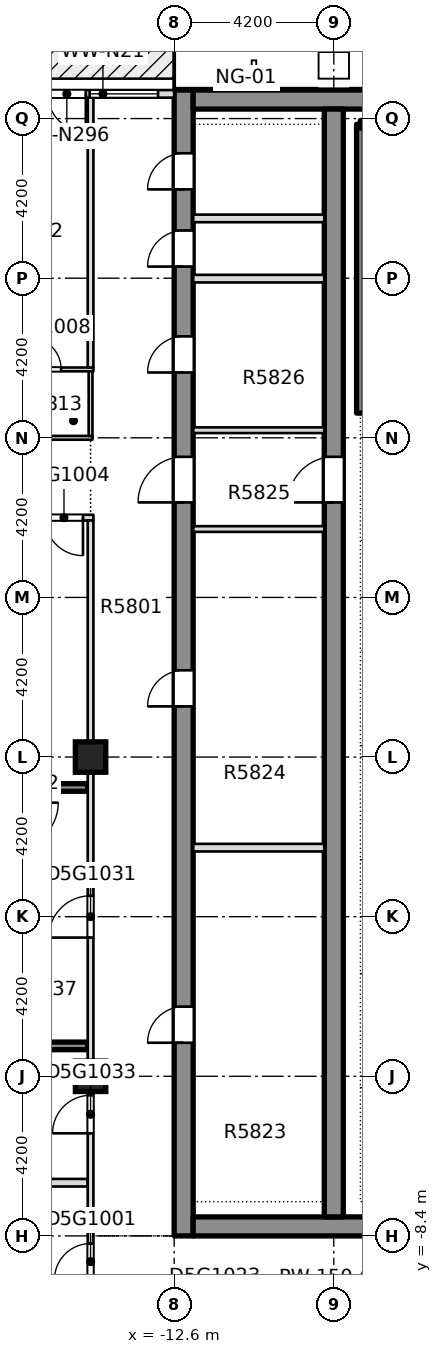
"""IFC4 building model, lengths in metres.
Left out: names, types, materials, properties, quantities, classifications, styles, units other than length and angle.
Written with IfcOpenShell. Run it as: python <this file> out.ifc"""

import sys

from ifc_helpers import new_model, si_unit, direction, frame, frame_2d, origin, origin_2d, place, context, subcontext, project, spatial, rectangle, extrude, element, fill, save


model = new_model("IFC4")
c1 = context("Model", 3, precision=1e-05, world=origin(), true_north=direction((0.0, 1.0)))
c2 = subcontext(c1, "Body", "Model", "MODEL_VIEW")
j1 = project(units=[si_unit("LENGTHUNIT", "METRE"), si_unit("PLANEANGLEUNIT", "RADIAN")], contexts=[c1])
p1 = place(None, origin())
s1 = spatial("IfcSite", under=j1, at=p1, CompositionType="ELEMENT")
p2 = place(p1, origin())
s2 = spatial("IfcBuilding", under=s1, at=p2, CompositionType="ELEMENT")
p3 = place(p2, frame((0.0, 0.0, 223.45)))
s3 = spatial("IfcBuildingStorey", under=s2, at=p3, CompositionType="ELEMENT", Elevation=223.45)
p4 = place(p3, frame((-12.35, -8.4, -0.4), z_axis=(0.0, 0.0, 1.0), x_axis=(0.0, 1.0, 0.0)))
e1 = element("IfcWall", 1, at=p4, inside=s3, PredefinedType="SHEAR", context=c2, shape_type="SweptSolid", body=[
    extrude(rectangle(XDim=30.15, YDim=0.5, at=frame_2d((15.075, 0.0))), origin(), (0.0, 0.0, 1.0), 3.45),
])
p5 = place(p4, frame((5.083, 0.0, 0.4)))
e2 = element("IfcOpeningElement", 2, at=p5, cuts=e1, PredefinedType="OPENING", context=c2, shape_type="SweptSolid", body=[
    extrude(rectangle(XDim=0.95, YDim=2.1, at=frame_2d((0.475, 1.05))), frame((0.0, 0.26, 0.0), z_axis=(0.0, -1.0, 0.0), x_axis=(1.0, 0.0, 0.0)), (0.0, 0.0, 1.0), 0.52),
])
p6 = place(p4, frame((13.933, 0.0, 0.4)))
e3 = element("IfcOpeningElement", 3, at=p6, cuts=e1, PredefinedType="OPENING", context=c2, shape_type="SweptSolid", body=[
    extrude(rectangle(XDim=0.95, YDim=2.1, at=frame_2d((0.475, 1.05))), frame((0.0, 0.26, 0.0), z_axis=(0.0, -1.0, 0.0), x_axis=(1.0, 0.0, 0.0)), (0.0, 0.0, 1.0), 0.52),
])
p7 = place(p4, frame((22.719, 0.0, 0.4)))
e4 = element("IfcOpeningElement", 4, at=p7, cuts=e1, PredefinedType="OPENING", context=c2, shape_type="SweptSolid", body=[
    extrude(rectangle(XDim=0.95, YDim=2.1, at=frame_2d((0.475, 1.05))), frame((0.0, 0.26, 0.0), z_axis=(0.0, -1.0, 0.0), x_axis=(1.0, 0.0, 0.0)), (0.0, 0.0, 1.0), 0.52),
])
p8 = place(p4, frame((25.506, 0.0, 0.4)))
e5 = element("IfcOpeningElement", 5, at=p8, cuts=e1, PredefinedType="OPENING", context=c2, shape_type="SweptSolid", body=[
    extrude(rectangle(XDim=0.95, YDim=2.1, at=frame_2d((0.475, 1.05))), frame((0.0, 0.26, 0.0), z_axis=(0.0, -1.0, 0.0), x_axis=(1.0, 0.0, 0.0)), (0.0, 0.0, 1.0), 0.52),
])
p9 = place(p4, frame((27.537, 0.0, 0.4)))
e6 = element("IfcOpeningElement", 6, at=p9, cuts=e1, PredefinedType="OPENING", context=c2, shape_type="SweptSolid", body=[
    extrude(rectangle(XDim=0.95, YDim=2.1, at=frame_2d((0.475, 1.05))), frame((0.0, 0.26, 0.0), z_axis=(0.0, -1.0, 0.0), x_axis=(1.0, 0.0, 0.0)), (0.0, 0.0, 1.0), 0.52),
])
p10 = place(p4, frame((19.3, 0.0, 0.4)))
e7 = element("IfcOpeningElement", 7, at=p10, cuts=e1, PredefinedType="OPENING", context=c2, shape_type="SweptSolid", body=[
    extrude(rectangle(XDim=1.2, YDim=2.1, at=frame_2d((0.6, 1.05))), frame((0.0, 0.26, 0.0), z_axis=(0.0, -1.0, 0.0), x_axis=(1.0, 0.0, 0.0)), (0.0, 0.0, 1.0), 0.52),
])
p11 = place(p3, frame((-12.1, -8.15, -0.4), z_axis=(0.0, 0.0, 1.0), x_axis=(1.0, 0.0, 0.0)))
e8 = element("IfcWall", 8, at=p11, inside=s3, PredefinedType="SHEAR", context=c2, shape_type="SweptSolid", body=[
    extrude(rectangle(XDim=24.2, YDim=0.5, at=frame_2d((12.1, 0.0))), origin(), (0.0, 0.0, 1.0), 3.45),
])
p12 = place(p11, frame((7.35, 0.0, 0.4)))
e9 = element("IfcOpeningElement", 9, at=p12, cuts=e8, PredefinedType="OPENING", context=c2, shape_type="SweptSolid", body=[
    extrude(rectangle(XDim=1.8, YDim=2.1, at=frame_2d((0.9, 1.05))), frame((0.0, 0.26, 0.0), z_axis=(0.0, -1.0, 0.0), x_axis=(1.0, 0.0, 0.0)), (0.0, 0.0, 1.0), 0.52),
])
p13 = place(p11, frame((15.05, 0.0, 0.4)))
e10 = element("IfcOpeningElement", 10, at=p13, cuts=e8, PredefinedType="OPENING", context=c2, shape_type="SweptSolid", body=[
    extrude(rectangle(XDim=1.8, YDim=2.1, at=frame_2d((0.9, 1.05))), frame((0.0, 0.26, 0.0), z_axis=(0.0, -1.0, 0.0), x_axis=(1.0, 0.0, 0.0)), (0.0, 0.0, 1.0), 0.52),
])
p14 = place(p3, frame((-12.1, 21.5, -0.4), z_axis=(0.0, 0.0, 1.0), x_axis=(1.0, 0.0, 0.0)))
e11 = element("IfcWall", 11, at=p14, inside=s3, PredefinedType="SHEAR", context=c2, shape_type="SweptSolid", body=[
    extrude(rectangle(XDim=24.2, YDim=0.5, at=frame_2d((12.1, 0.0))), origin(), (0.0, 0.0, 1.0), 3.45),
])
p15 = place(p3, frame((-8.4, -7.9, -0.4), z_axis=(0.0, 0.0, 1.0), x_axis=(0.0, 1.0, 0.0)))
e12 = element("IfcWall", 12, at=p15, inside=s3, PredefinedType="SHEAR", context=c2, shape_type="SweptSolid", body=[
    extrude(rectangle(XDim=29.15, YDim=0.5, at=frame_2d((14.575, 0.0))), origin(), (0.0, 0.0, 1.0), 3.45),
])
p16 = place(p15, frame((18.8, 0.0, 0.4)))
e13 = element("IfcOpeningElement", 13, at=p16, cuts=e12, PredefinedType="OPENING", context=c2, shape_type="SweptSolid", body=[
    extrude(rectangle(XDim=1.2, YDim=2.1, at=frame_2d((0.6, 1.05))), frame((0.0, 0.26, 0.0), z_axis=(0.0, -1.0, 0.0), x_axis=(1.0, 0.0, 0.0)), (0.0, 0.0, 1.0), 0.52),
])
for number, where, z_axis, x_axis in (
    (14, (-14.8, -4.2, -0.4), (0.0, 0.0, 1.0), (1.0, 0.0, 0.0)),
    (15, (-14.8, 4.2, -0.4), (0.0, 0.0, 1.0), (1.0, 0.0, 0.0)),
):
    element("IfcColumn", number, at=place(p3, frame(where, z_axis=z_axis, x_axis=x_axis)), inside=s3, PredefinedType="COLUMN", context=c2, shape_type="SweptSolid", body=[
        extrude(rectangle(XDim=0.8, YDim=0.8, at=origin_2d()), origin(), (0.0, 0.0, 1.0), 3.45),
    ])
p17 = place(p3, frame((-25.75, -7.0, 0.0), z_axis=(0.0, 0.0, 1.0), x_axis=(1.0, 0.0, 0.0)))
e16 = element("IfcWall", 16, at=p17, inside=s3, PredefinedType="PARTITIONING", context=c2, shape_type="SweptSolid", body=[
    extrude(rectangle(XDim=10.875, YDim=0.2, at=frame_2d((5.438, 0.0))), origin(), (0.0, 0.0, 1.0), 3.05),
])
p18 = place(p3, frame((-23.0, -3.4, 0.0), z_axis=(0.0, 0.0, 1.0), x_axis=(1.0, 0.0, 0.0)))
e17 = element("IfcWall", 17, at=p18, inside=s3, PredefinedType="SOLIDWALL", context=c2, shape_type="SweptSolid", body=[
    extrude(rectangle(XDim=8.125, YDim=0.2, at=frame_2d((4.062, 0.0))), origin(), (0.0, 0.0, 1.0), 3.05),
])
p19 = place(p3, frame((-20.45, 3.4, 0.0), z_axis=(0.0, 0.0, 1.0), x_axis=(1.0, 0.0, 0.0)))
e18 = element("IfcWall", 18, at=p19, inside=s3, PredefinedType="SOLIDWALL", context=c2, shape_type="SweptSolid", body=[
    extrude(rectangle(XDim=5.575, YDim=0.2, at=frame_2d((2.788, 0.0))), origin(), (0.0, 0.0, 1.0), 3.05),
])
p20 = place(p3, frame((-25.75, 10.5, 0.0), z_axis=(0.0, 0.0, 1.0), x_axis=(1.0, 0.0, 0.0)))
e19 = element("IfcWall", 19, at=p20, inside=s3, PredefinedType="PARTITIONING", context=c2, shape_type="SweptSolid", body=[
    extrude(rectangle(XDim=11.025, YDim=0.15, at=frame_2d((5.512, 0.0))), origin(), (0.0, 0.0, 1.0), 3.05),
])
p21 = place(p20, frame((9.75, 0.0, 0.0)))
e20 = element("IfcOpeningElement", 20, at=p21, cuts=e19, PredefinedType="OPENING", context=c2, shape_type="SweptSolid", body=[
    extrude(rectangle(XDim=1.0, YDim=2.1, at=frame_2d((0.5, 1.05))), frame((0.0, 0.085, 0.0), z_axis=(0.0, -1.0, 0.0), x_axis=(1.0, 0.0, 0.0)), (0.0, 0.0, 1.0), 0.17),
])
p22 = place(p3, frame((-17.25, 12.6, 0.0), z_axis=(0.0, 0.0, 1.0), x_axis=(1.0, 0.0, 0.0)))
e21 = element("IfcWall", 21, at=p22, inside=s3, PredefinedType="PARTITIONING", context=c2, shape_type="SweptSolid", body=[
    extrude(rectangle(XDim=2.5, YDim=0.1, at=frame_2d((1.25, 0.0))), origin(), (0.0, 0.0, 1.0), 3.05),
])
p23 = place(p3, frame((-17.25, 14.4, 0.0), z_axis=(0.0, 0.0, 1.0), x_axis=(1.0, 0.0, 0.0)))
e22 = element("IfcWall", 22, at=p23, inside=s3, PredefinedType="PARTITIONING", context=c2, shape_type="SweptSolid", body=[
    extrude(rectangle(XDim=2.525, YDim=0.1, at=frame_2d((1.262, 0.0))), origin(), (0.0, 0.0, 1.0), 3.05),
])
p24 = place(p23, frame((0.825, 0.0, 0.0)))
e23 = element("IfcOpeningElement", 23, at=p24, cuts=e22, PredefinedType="OPENING", context=c2, shape_type="SweptSolid", body=[
    extrude(rectangle(XDim=0.85, YDim=2.1, at=frame_2d((0.425, 1.05))), frame((0.0, 0.06, 0.0), z_axis=(0.0, -1.0, 0.0), x_axis=(1.0, 0.0, 0.0)), (0.0, 0.0, 1.0), 0.12),
])
p25 = place(p3, frame((-14.8, -10.38, 0.0), z_axis=(0.0, 0.0, 1.0), x_axis=(0.0, 1.0, 0.0)))
e24 = element("IfcWall", 24, at=p25, inside=s3, PredefinedType="PARTITIONING", context=c2, shape_type="SweptSolid", body=[
    extrude(rectangle(XDim=20.805, YDim=0.15, at=frame_2d((10.402, 0.0))), origin(), (0.0, 0.0, 1.0), 3.05),
])
p26 = place(p25, frame((0.83, 0.0, 0.0)))
e25 = element("IfcOpeningElement", 25, at=p26, cuts=e24, PredefinedType="OPENING", context=c2, shape_type="SweptSolid", body=[
    extrude(rectangle(XDim=0.95, YDim=2.1, at=frame_2d((0.475, 1.05))), frame((0.0, 0.085, 0.0), z_axis=(0.0, -1.0, 0.0), x_axis=(1.0, 0.0, 0.0)), (0.0, 0.0, 1.0), 0.17),
])
p27 = place(p25, frame((9.83, 0.0, 0.0)))
e26 = element("IfcOpeningElement", 26, at=p27, cuts=e24, PredefinedType="OPENING", context=c2, shape_type="SweptSolid", body=[
    extrude(rectangle(XDim=1.1, YDim=2.1, at=frame_2d((0.55, 1.05))), frame((0.0, 0.085, 0.0), z_axis=(0.0, -1.0, 0.0), x_axis=(1.0, 0.0, 0.0)), (0.0, 0.0, 1.0), 0.17),
])
p28 = place(p25, frame((4.68, 0.0, 0.0)))
e27 = element("IfcOpeningElement", 27, at=p28, cuts=e24, PredefinedType="OPENING", context=c2, shape_type="SweptSolid", body=[
    extrude(rectangle(XDim=1.0, YDim=2.1, at=frame_2d((0.5, 1.05))), frame((0.0, 0.085, 0.0), z_axis=(0.0, -1.0, 0.0), x_axis=(1.0, 0.0, 0.0)), (0.0, 0.0, 1.0), 0.17),
])
p29 = place(p3, frame((-14.8, 12.65, 0.0), z_axis=(0.0, 0.0, 1.0), x_axis=(0.0, 1.0, 0.0)))
e28 = element("IfcWall", 28, at=p29, inside=s3, PredefinedType="PARTITIONING", context=c2, shape_type="SweptSolid", body=[
    extrude(rectangle(XDim=1.7, YDim=0.1, at=frame_2d((0.85, 0.0))), origin(), (0.0, 0.0, 1.0), 3.05),
])
p30 = place(p3, frame((-14.8, 14.45, 0.0), z_axis=(0.0, 0.0, 1.0), x_axis=(0.0, 1.0, 0.0)))
e29 = element("IfcWall", 29, at=p30, inside=s3, PredefinedType="PARTITIONING", context=c2, shape_type="SweptSolid", body=[
    extrude(rectangle(XDim=7.1, YDim=0.15, at=frame_2d((3.55, 0.0))), origin(), (0.0, 0.0, 1.0), 3.05),
])
p31 = place(p3, frame((-12.6, 21.65, 0.0), z_axis=(0.0, 0.0, 1.0), x_axis=(-1.0, 0.0, 0.0)))
e30 = element("IfcWall", 30, at=p31, inside=s3, PredefinedType="STANDARD", context=c2, shape_type="SweptSolid", body=[
    extrude(rectangle(XDim=3.75, YDim=0.2, at=frame_2d((1.875, 0.0))), origin(), (0.0, 0.0, 1.0), 3.05),
])
p32 = place(p31, frame((0.425, 0.0, 0.2)))
e31 = element("IfcOpeningElement", 31, at=p32, cuts=e30, PredefinedType="OPENING", context=c2, shape_type="SweptSolid", body=[
    extrude(rectangle(XDim=1.8, YDim=2.65, at=frame_2d((0.9, 1.325))), frame((0.0, 0.11, 0.0), z_axis=(0.0, -1.0, 0.0), x_axis=(1.0, 0.0, 0.0)), (0.0, 0.0, 1.0), 0.22),
])
p33 = place(p31, frame((2.325, 0.0, 0.0)))
e32 = element("IfcOpeningElement", 32, at=p33, cuts=e30, PredefinedType="OPENING", context=c2, shape_type="SweptSolid", body=[
    extrude(rectangle(XDim=1.0, YDim=2.4, at=frame_2d((0.5, 1.2))), frame((0.0, 0.11, 0.0), z_axis=(0.0, -1.0, 0.0), x_axis=(1.0, 0.0, 0.0)), (0.0, 0.0, 1.0), 0.22),
])
p34 = place(p3, frame((-12.099, 1.816, 0.0), z_axis=(0.0, 0.0, 1.0), x_axis=(1.0, 0.0, 0.0)))
e33 = element("IfcWall", 33, at=p34, inside=s3, PredefinedType="PARTITIONING", context=c2, shape_type="SweptSolid", body=[
    extrude(rectangle(XDim=3.448, YDim=0.2, at=frame_2d((1.724, 0.0))), origin(), (0.0, 0.0, 1.0), 3.05),
])
for number, where, z_axis, x_axis in (
    (34, (-12.099, 10.2, 0.0), (0.0, 0.0, 1.0), (1.0, 0.0, 0.0)),
    (35, (-12.099, 12.8, 0.0), (0.0, 0.0, 1.0), (1.0, 0.0, 0.0)),
):
    element("IfcWall", number, at=place(p3, frame(where, z_axis=z_axis, x_axis=x_axis)), inside=s3, PredefinedType="PARTITIONING", context=c2, shape_type="SweptSolid", body=[
        extrude(rectangle(XDim=3.448, YDim=0.15, at=frame_2d((1.724, 0.0))), origin(), (0.0, 0.0, 1.0), 3.05),
    ])
for number, where, z_axis, x_axis in (
    (36, (-12.099, 16.788, 0.0), (0.0, 0.0, 1.0), (1.0, 0.0, 0.0)),
    (37, (-12.099, 18.373, 0.0), (0.0, 0.0, 1.0), (1.0, 0.0, 0.0)),
):
    element("IfcWall", number, at=place(p3, frame(where, z_axis=z_axis, x_axis=x_axis)), inside=s3, PredefinedType="PARTITIONING", context=c2, shape_type="SweptSolid", body=[
        extrude(rectangle(XDim=3.448, YDim=0.2, at=frame_2d((1.724, 0.0))), origin(), (0.0, 0.0, 1.0), 3.05),
    ])
p35 = place(p3, frame((-7.7, 13.25, 0.0), z_axis=(0.0, 0.0, 1.0), x_axis=(0.0, 1.0, 0.0)))
e38 = element("IfcWall", 38, at=p35, inside=s3, PredefinedType="SOLIDWALL", context=c2, shape_type="SweptSolid", body=[
    extrude(rectangle(XDim=7.6, YDim=0.2, at=frame_2d((3.8, 0.0))), origin(), (0.0, 0.0, 1.0), 3.05),
])
p36 = place(p3, frame((-7.7, 20.85, 0.0), z_axis=(0.0, 0.0, 1.0), x_axis=(1.0, 0.0, 0.0)))
e39 = element("IfcWall", 39, at=p36, inside=s3, PredefinedType="SOLIDWALL", context=c2, shape_type="SweptSolid", body=[
    extrude(rectangle(XDim=3.55, YDim=0.2, at=frame_2d((1.775, 0.0))), origin(), (0.0, 0.0, 1.0), 3.05),
])
p37 = place(p26, origin())
e40 = element("IfcDoor", 40, at=p37, inside=s3, OperationType="SINGLE_SWING_LEFT", PredefinedType="DOOR", context=c2, shape_type="SweptSolid", body=[
    extrude(rectangle(XDim=0.95, YDim=2.1, at=frame_2d((0.475, 1.05))), frame((0.0, 0.025, 0.0), z_axis=(0.0, -1.0, 0.0), x_axis=(1.0, 0.0, 0.0)), (0.0, 0.0, 1.0), 0.05),
])
fill(e25, e40)
p38 = place(p21, origin())
e41 = element("IfcDoor", 41, at=p38, inside=s3, OperationType="SINGLE_SWING_RIGHT", PredefinedType="DOOR", context=c2, shape_type="SweptSolid", body=[
    extrude(rectangle(XDim=1.0, YDim=2.1, at=frame_2d((0.5, 1.05))), frame((0.0, 0.025, 0.0), z_axis=(0.0, -1.0, 0.0), x_axis=(1.0, 0.0, 0.0)), (0.0, 0.0, 1.0), 0.05),
])
fill(e20, e41)
p39 = place(p24, origin())
e42 = element("IfcDoor", 42, at=p39, inside=s3, OperationType="SINGLE_SWING_RIGHT", PredefinedType="DOOR", context=c2, shape_type="SweptSolid", body=[
    extrude(rectangle(XDim=0.85, YDim=2.1, at=frame_2d((0.425, 1.05))), frame((0.0, 0.025, 0.0), z_axis=(0.0, -1.0, 0.0), x_axis=(1.0, 0.0, 0.0)), (0.0, 0.0, 1.0), 0.05),
])
fill(e23, e42)
p40 = place(p27, origin())
e43 = element("IfcDoor", 43, at=p40, inside=s3, OperationType="SINGLE_SWING_RIGHT", PredefinedType="DOOR", context=c2, shape_type="SweptSolid", body=[
    extrude(rectangle(XDim=1.1, YDim=2.1, at=frame_2d((0.55, 1.05))), frame((0.0, 0.025, 0.0), z_axis=(0.0, -1.0, 0.0), x_axis=(1.0, 0.0, 0.0)), (0.0, 0.0, 1.0), 0.05),
])
fill(e26, e43)
p41 = place(p28, origin())
e44 = element("IfcDoor", 44, at=p41, inside=s3, OperationType="SINGLE_SWING_LEFT", PredefinedType="DOOR", context=c2, shape_type="SweptSolid", body=[
    extrude(rectangle(XDim=1.0, YDim=2.1, at=frame_2d((0.5, 1.05))), frame((0.0, 0.025, 0.0), z_axis=(0.0, -1.0, 0.0), x_axis=(1.0, 0.0, 0.0)), (0.0, 0.0, 1.0), 0.05),
])
fill(e27, e44)
p42 = place(p32, origin())
e45 = element("IfcWindow", 45, at=p42, inside=s3, PartitioningType="SINGLE_PANEL", PredefinedType="WINDOW", context=c2, shape_type="SweptSolid", body=[
    extrude(rectangle(XDim=1.8, YDim=2.65, at=frame_2d((0.9, 1.325))), frame((0.0, 0.03, 0.0), z_axis=(0.0, -1.0, 0.0), x_axis=(1.0, 0.0, 0.0)), (0.0, 0.0, 1.0), 0.06),
])
fill(e31, e45)
p43 = place(p33, origin())
e46 = element("IfcDoor", 46, at=p43, inside=s3, OperationType="SINGLE_SWING_LEFT", PredefinedType="DOOR", context=c2, shape_type="SweptSolid", body=[
    extrude(rectangle(XDim=1.0, YDim=2.4, at=frame_2d((0.5, 1.2))), frame((0.0, 0.025, 0.0), z_axis=(0.0, -1.0, 0.0), x_axis=(1.0, 0.0, 0.0)), (0.0, 0.0, 1.0), 0.05),
])
fill(e32, e46)
p44 = place(p5, origin())
e47 = element("IfcDoor", 47, at=p44, inside=s3, OperationType="SINGLE_SWING_LEFT", PredefinedType="DOOR", context=c2, shape_type="SweptSolid", body=[
    extrude(rectangle(XDim=0.95, YDim=2.1, at=frame_2d((0.475, 1.05))), frame((0.0, 0.025, 0.0), z_axis=(0.0, -1.0, 0.0), x_axis=(1.0, 0.0, 0.0)), (0.0, 0.0, 1.0), 0.05),
])
fill(e2, e47)
p45 = place(p6, origin())
e48 = element("IfcDoor", 48, at=p45, inside=s3, OperationType="SINGLE_SWING_LEFT", PredefinedType="DOOR", context=c2, shape_type="SweptSolid", body=[
    extrude(rectangle(XDim=0.95, YDim=2.1, at=frame_2d((0.475, 1.05))), frame((0.0, 0.025, 0.0), z_axis=(0.0, -1.0, 0.0), x_axis=(1.0, 0.0, 0.0)), (0.0, 0.0, 1.0), 0.05),
])
fill(e3, e48)
p46 = place(p7, origin())
e49 = element("IfcDoor", 49, at=p46, inside=s3, OperationType="SINGLE_SWING_LEFT", PredefinedType="DOOR", context=c2, shape_type="SweptSolid", body=[
    extrude(rectangle(XDim=0.95, YDim=2.1, at=frame_2d((0.475, 1.05))), frame((0.0, 0.025, 0.0), z_axis=(0.0, -1.0, 0.0), x_axis=(1.0, 0.0, 0.0)), (0.0, 0.0, 1.0), 0.05),
])
fill(e4, e49)
p47 = place(p8, origin())
e50 = element("IfcDoor", 50, at=p47, inside=s3, OperationType="SINGLE_SWING_LEFT", PredefinedType="DOOR", context=c2, shape_type="SweptSolid", body=[
    extrude(rectangle(XDim=0.95, YDim=2.1, at=frame_2d((0.475, 1.05))), frame((0.0, 0.025, 0.0), z_axis=(0.0, -1.0, 0.0), x_axis=(1.0, 0.0, 0.0)), (0.0, 0.0, 1.0), 0.05),
])
fill(e5, e50)
p48 = place(p9, origin())
e51 = element("IfcDoor", 51, at=p48, inside=s3, OperationType="SINGLE_SWING_LEFT", PredefinedType="DOOR", context=c2, shape_type="SweptSolid", body=[
    extrude(rectangle(XDim=0.95, YDim=2.1, at=frame_2d((0.475, 1.05))), frame((0.0, 0.025, 0.0), z_axis=(0.0, -1.0, 0.0), x_axis=(1.0, 0.0, 0.0)), (0.0, 0.0, 1.0), 0.05),
])
fill(e6, e51)
p49 = place(p10, origin())
e52 = element("IfcDoor", 52, at=p49, inside=s3, OperationType="SINGLE_SWING_LEFT", PredefinedType="DOOR", context=c2, shape_type="SweptSolid", body=[
    extrude(rectangle(XDim=1.2, YDim=2.1, at=frame_2d((0.6, 1.05))), frame((0.0, 0.025, 0.0), z_axis=(0.0, -1.0, 0.0), x_axis=(1.0, 0.0, 0.0)), (0.0, 0.0, 1.0), 0.05),
])
fill(e7, e52)
p50 = place(p16, origin())
e53 = element("IfcDoor", 53, at=p50, inside=s3, OperationType="SINGLE_SWING_LEFT", PredefinedType="DOOR", context=c2, shape_type="SweptSolid", body=[
    extrude(rectangle(XDim=1.2, YDim=2.1, at=frame_2d((0.6, 1.05))), frame((0.0, 0.025, 0.0), z_axis=(0.0, -1.0, 0.0), x_axis=(1.0, 0.0, 0.0)), (0.0, 0.0, 1.0), 0.05),
])
fill(e13, e53)
save(model, sys.argv[1])
